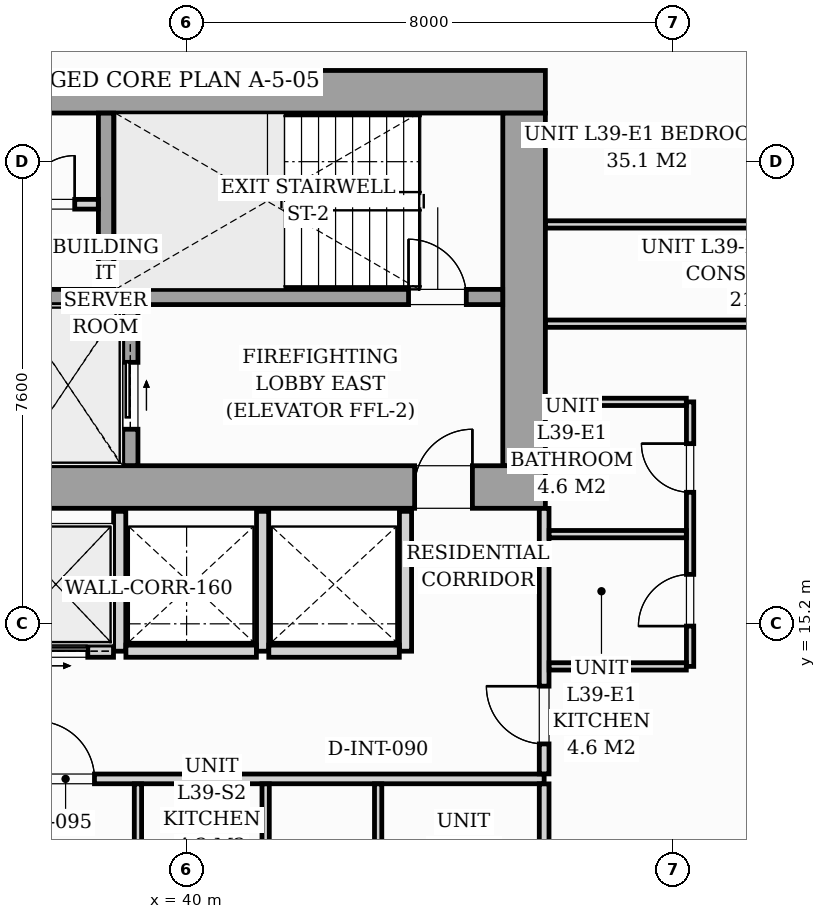
"""IFC4 building model, lengths in metres.
Left out: names, types, materials, properties, quantities, classifications, styles, units other than length and angle.
Written with IfcOpenShell. Run it as: python <this file> out.ifc"""

import sys

from ifc_helpers import new_model, si_unit, direction, frame, frame_2d, origin, origin_2d, place, context, subcontext, project, spatial, rectangle, i_section, extrude, source, transform, mapped, element, fill, save


model = new_model("IFC4")
c1 = context("Model", 3, precision=1e-05, world=origin(), true_north=direction((0.0, 1.0)))
c2 = subcontext(c1, "Body", "Model", "MODEL_VIEW")
j1 = project(units=[si_unit("LENGTHUNIT", "METRE"), si_unit("PLANEANGLEUNIT", "RADIAN")], contexts=[c1])
p1 = place(None, origin())
s1 = spatial("IfcSite", under=j1, at=p1, CompositionType="ELEMENT")
p2 = place(p1, origin())
s2 = spatial("IfcBuilding", under=s1, at=p2, CompositionType="ELEMENT")
p3 = place(p2, frame((0.0, 0.0, 137.4)))
s3 = spatial("IfcBuildingStorey", under=s2, at=p3, CompositionType="ELEMENT", Elevation=137.4)
m1 = source(origin(), c2, "Body", "SweptSolid", [
    extrude(i_section(OverallWidth=0.421, OverallDepth=0.465, WebThickness=0.045, FlangeThickness=0.073, FilletRadius=0.018, at=origin_2d()), origin(), (0.0, 0.0, 1.0), 3.196),
])
for number, where, z_axis, x_axis in (
    (1, (38.88, 17.4, 0.002), (0.0, 0.0, 1.0), (1.0, 0.0, 0.0)),
    (2, (45.6, 17.4, 0.002), (0.0, 0.0, 1.0), (1.0, 0.0, 0.0)),
    (3, (38.88, 24.0, 0.002), (0.0, 0.0, 1.0), (1.0, 0.0, 0.0)),
    (4, (45.6, 24.0, 0.002), (0.0, 0.0, 1.0), (1.0, 0.0, 0.0)),
):
    element("IfcColumn", number, at=place(p3, frame(where, z_axis=z_axis, x_axis=x_axis)), inside=s3, PredefinedType="PILASTER", context=c2, shape_type="MappedRepresentation", body=[
        mapped(m1, transform((0.0, 0.0, 0.0), scale=1.0)),
    ])
p4 = place(p3, frame((40.983, 25.727, 0.0), z_axis=(0.0, 0.0, 1.0), x_axis=(0.995395844771, -0.095849424686, 0.0)))
e5 = element("IfcWall", 5, at=p4, inside=s3, PredefinedType="STANDARD", context=c2, shape_type="SweptSolid", body=[
    extrude(rectangle(XDim=17.01, YDim=0.26, at=frame_2d((8.505, 0.0))), origin(), (0.0, 0.0, 1.0), 2.94),
])
p5 = place(p4, frame((8.79, 0.0, 0.0)))
e6 = element("IfcOpeningElement", 6, at=p5, cuts=e5, PredefinedType="OPENING", context=c2, shape_type="SweptSolid", body=[
    extrude(rectangle(XDim=1.8, YDim=2.06, at=frame_2d((0.9, 1.03))), frame((0.0, 0.14, 0.0), z_axis=(0.0, -1.0, 0.0), x_axis=(1.0, 0.0, 0.0)), (0.0, 0.0, 1.0), 0.28),
])
p6 = place(p4, frame((0.7, 0.0, 0.65)))
e7 = element("IfcOpeningElement", 7, at=p6, cuts=e5, PredefinedType="OPENING", context=c2, shape_type="SweptSolid", body=[
    extrude(rectangle(XDim=1.6, YDim=1.5, at=frame_2d((0.8, 0.75))), frame((0.0, 0.14, 0.0), z_axis=(0.0, -1.0, 0.0), x_axis=(1.0, 0.0, 0.0)), (0.0, 0.0, 1.0), 0.28),
])
p7 = place(p3, frame((26.1, 17.45, 0.0), z_axis=(0.0, 0.0, 1.0), x_axis=(1.0, 0.0, 0.0)))
e8 = element("IfcWall", 8, at=p7, inside=s3, PredefinedType="SHEAR", context=c2, shape_type="SweptSolid", body=[
    extrude(rectangle(XDim=19.8, YDim=0.7, at=frame_2d((9.9, 0.0))), origin(), (0.0, 0.0, 1.0), 3.2),
])
p8 = place(p7, frame((1.05, 0.0, 0.0)))
e9 = element("IfcOpeningElement", 9, at=p8, cuts=e8, PredefinedType="OPENING", context=c2, shape_type="SweptSolid", body=[
    extrude(rectangle(XDim=0.95, YDim=2.06, at=frame_2d((0.475, 1.03))), frame((0.0, 0.36, 0.0), z_axis=(0.0, -1.0, 0.0), x_axis=(1.0, 0.0, 0.0)), (0.0, 0.0, 1.0), 0.72),
])
p9 = place(p7, frame((9.48, 0.0, 0.0)))
e10 = element("IfcOpeningElement", 10, at=p9, cuts=e8, PredefinedType="OPENING", context=c2, shape_type="SweptSolid", body=[
    extrude(rectangle(XDim=0.85, YDim=2.0, at=frame_2d((0.425, 1.0))), frame((0.0, 0.36, 0.0), z_axis=(0.0, -1.0, 0.0), x_axis=(1.0, 0.0, 0.0)), (0.0, 0.0, 1.0), 0.72),
])
p10 = place(p7, frame((17.65, 0.0, 0.0)))
e11 = element("IfcOpeningElement", 11, at=p10, cuts=e8, PredefinedType="OPENING", context=c2, shape_type="SweptSolid", body=[
    extrude(rectangle(XDim=0.95, YDim=2.06, at=frame_2d((0.475, 1.03))), frame((0.0, 0.36, 0.0), z_axis=(0.0, -1.0, 0.0), x_axis=(1.0, 0.0, 0.0)), (0.0, 0.0, 1.0), 0.72),
])
p11 = place(p3, frame((26.1, 23.95, 0.0), z_axis=(0.0, 0.0, 1.0), x_axis=(1.0, 0.0, 0.0)))
e12 = element("IfcWall", 12, at=p11, inside=s3, PredefinedType="SHEAR", context=c2, shape_type="SweptSolid", body=[
    extrude(rectangle(XDim=19.8, YDim=0.7, at=frame_2d((9.9, 0.0))), origin(), (0.0, 0.0, 1.0), 3.2),
])
p12 = place(p3, frame((45.55, 17.802, 0.0), z_axis=(0.0, 0.0, 1.0), x_axis=(0.0, 1.0, 0.0)))
e13 = element("IfcWall", 13, at=p12, inside=s3, PredefinedType="SHEAR", context=c2, shape_type="SweptSolid", body=[
    extrude(rectangle(XDim=5.796, YDim=0.7, at=frame_2d((2.898, 0.0))), origin(), (0.0, 0.0, 1.0), 3.2),
])
p13 = place(p3, frame((37.05, 20.575, 0.0), z_axis=(0.0, 0.0, 1.0), x_axis=(1.0, 0.0, 0.0)))
e14 = element("IfcWall", 14, at=p13, inside=s3, PredefinedType="SOLIDWALL", context=c2, shape_type="SweptSolid", body=[
    extrude(rectangle(XDim=8.148, YDim=0.25, at=frame_2d((4.074, 0.0))), origin(), (0.0, 0.0, 1.0), 3.2),
])
p14 = place(p13, frame((6.6, 0.0, 0.0)))
e15 = element("IfcOpeningElement", 15, at=p14, cuts=e14, PredefinedType="OPENING", context=c2, shape_type="SweptSolid", body=[
    extrude(rectangle(XDim=0.95, YDim=2.06, at=frame_2d((0.475, 1.03))), frame((0.0, 0.135, 0.0), z_axis=(0.0, -1.0, 0.0), x_axis=(1.0, 0.0, 0.0)), (0.0, 0.0, 1.0), 0.27),
])
p15 = place(p3, frame((38.675, 20.702, 0.0), z_axis=(0.0, 0.0, 1.0), x_axis=(0.0, 1.0, 0.0)))
e16 = element("IfcWall", 16, at=p15, inside=s3, PredefinedType="SOLIDWALL", context=c2, shape_type="SweptSolid", body=[
    extrude(rectangle(XDim=2.896, YDim=0.25, at=frame_2d((1.448, 0.0))), origin(), (0.0, 0.0, 1.0), 3.2),
])
p16 = place(p3, frame((39.075, 17.802, 0.0), z_axis=(0.0, 0.0, 1.0), x_axis=(0.0, 1.0, 0.0)))
e17 = element("IfcWall", 17, at=p16, inside=s3, PredefinedType="SOLIDWALL", context=c2, shape_type="SweptSolid", body=[
    extrude(rectangle(XDim=2.646, YDim=0.25, at=frame_2d((1.323, 0.0))), origin(), (0.0, 0.0, 1.0), 3.2),
])
p17 = place(p16, frame((0.598, 0.0, 0.0)))
e18 = element("IfcOpeningElement", 18, at=p17, cuts=e17, PredefinedType="OPENING", context=c2, shape_type="SweptSolid", body=[
    extrude(rectangle(XDim=1.1, YDim=2.08, at=frame_2d((0.55, 1.04))), frame((0.0, 0.135, 0.0), z_axis=(0.0, -1.0, 0.0), x_axis=(1.0, 0.0, 0.0)), (0.0, 0.0, 1.0), 0.27),
])
p18 = place(p3, frame((33.452, 22.1, 0.0), z_axis=(0.0, 0.0, 1.0), x_axis=(1.0, 0.0, 0.0)))
e19 = element("IfcWall", 19, at=p18, inside=s3, PredefinedType="PARTITIONING", context=c2, shape_type="SweptSolid", body=[
    extrude(rectangle(XDim=5.096, YDim=0.16, at=frame_2d((2.548, 0.0))), origin(), (0.0, 0.0, 1.0), 2.94),
])
p19 = place(p18, frame((0.388, 0.0, 0.0)))
e20 = element("IfcOpeningElement", 20, at=p19, cuts=e19, PredefinedType="OPENING", context=c2, shape_type="SweptSolid", body=[
    extrude(rectangle(XDim=0.8, YDim=2.05, at=frame_2d((0.4, 1.025))), frame((0.0, 0.09, 0.0), z_axis=(0.0, -1.0, 0.0), x_axis=(1.0, 0.0, 0.0)), (0.0, 0.0, 1.0), 0.18),
])
p20 = place(p18, frame((2.148, 0.0, 0.0)))
e21 = element("IfcOpeningElement", 21, at=p20, cuts=e19, PredefinedType="OPENING", context=c2, shape_type="SweptSolid", body=[
    extrude(rectangle(XDim=0.8, YDim=2.05, at=frame_2d((0.4, 1.025))), frame((0.0, 0.09, 0.0), z_axis=(0.0, -1.0, 0.0), x_axis=(1.0, 0.0, 0.0)), (0.0, 0.0, 1.0), 0.18),
])
p21 = place(p18, frame((3.908, 0.0, 0.0)))
e22 = element("IfcOpeningElement", 22, at=p21, cuts=e19, PredefinedType="OPENING", context=c2, shape_type="SweptSolid", body=[
    extrude(rectangle(XDim=0.8, YDim=2.05, at=frame_2d((0.4, 1.025))), frame((0.0, 0.09, 0.0), z_axis=(0.0, -1.0, 0.0), x_axis=(1.0, 0.0, 0.0)), (0.0, 0.0, 1.0), 0.18),
])
p22 = place(p3, frame((38.9, 14.75, 0.0), z_axis=(0.0, 0.0, 1.0), x_axis=(0.0, 1.0, 0.0)))
e23 = element("IfcWall", 23, at=p22, inside=s3, PredefinedType="PARTITIONING", context=c2, shape_type="SweptSolid", body=[
    extrude(rectangle(XDim=2.3, YDim=0.2, at=frame_2d((1.15, 0.0))), origin(), (0.0, 0.0, 1.0), 2.94),
])
p23 = place(p3, frame((36.902, 14.75, 0.0), z_axis=(0.0, 0.0, 1.0), x_axis=(1.0, 0.0, 0.0)))
e24 = element("IfcWall", 24, at=p23, inside=s3, PredefinedType="PARTITIONING", context=c2, shape_type="SweptSolid", body=[
    extrude(rectangle(XDim=1.896, YDim=0.2, at=frame_2d((0.948, 0.0))), origin(), (0.0, 0.0, 1.0), 2.94),
])
p24 = place(p23, frame((0.423, 0.0, 0.0)))
e25 = element("IfcOpeningElement", 25, at=p24, cuts=e24, PredefinedType="OPENING", context=c2, shape_type="SweptSolid", body=[
    extrude(rectangle(XDim=1.05, YDim=2.08, at=frame_2d((0.525, 1.04))), frame((0.0, 0.11, 0.0), z_axis=(0.0, -1.0, 0.0), x_axis=(1.0, 0.0, 0.0)), (0.0, 0.0, 1.0), 0.22),
])
for number, where, z_axis, x_axis in (
    (26, (41.25, 14.75, 0.0), (0.0, 0.0, 1.0), (0.0, 1.0, 0.0)),
    (27, (43.6, 14.75, 0.0), (0.0, 0.0, 1.0), (0.0, 1.0, 0.0)),
):
    element("IfcWall", number, at=place(p3, frame(where, z_axis=z_axis, x_axis=x_axis)), inside=s3, PredefinedType="PARTITIONING", context=c2, shape_type="SweptSolid", body=[
        extrude(rectangle(XDim=2.3, YDim=0.2, at=frame_2d((1.15, 0.0))), origin(), (0.0, 0.0, 1.0), 2.94),
    ])
for number, where, z_axis, x_axis in (
    (28, (39.002, 14.75, 0.0), (0.0, 0.0, 1.0), (1.0, 0.0, 0.0)),
    (29, (41.352, 14.75, 0.0), (0.0, 0.0, 1.0), (1.0, 0.0, 0.0)),
):
    element("IfcWall", number, at=place(p3, frame(where, z_axis=z_axis, x_axis=x_axis)), inside=s3, PredefinedType="PARTITIONING", context=c2, shape_type="SweptSolid", body=[
        extrude(rectangle(XDim=2.146, YDim=0.2, at=frame_2d((1.073, 0.0))), origin(), (0.0, 0.0, 1.0), 2.94),
    ])
p25 = place(p3, frame((22.05, 12.65, 0.0), z_axis=(0.0, 0.0, 1.0), x_axis=(1.0, 0.0, 0.0)))
e30 = element("IfcWall", 30, at=p25, inside=s3, PredefinedType="PARTITIONING", context=c2, shape_type="SweptSolid", body=[
    extrude(rectangle(XDim=23.83, YDim=0.16, at=frame_2d((11.915, 0.0))), origin(), (0.0, 0.0, 1.0), 2.94),
])
p26 = place(p25, frame((3.0, 0.0, 0.0)))
e31 = element("IfcOpeningElement", 31, at=p26, cuts=e30, PredefinedType="OPENING", context=c2, shape_type="SweptSolid", body=[
    extrude(rectangle(XDim=0.95, YDim=2.06, at=frame_2d((0.475, 1.03))), frame((0.0, 0.09, 0.0), z_axis=(0.0, -1.0, 0.0), x_axis=(1.0, 0.0, 0.0)), (0.0, 0.0, 1.0), 0.18),
])
p27 = place(p25, frame((15.485, 0.0, 0.0)))
e32 = element("IfcOpeningElement", 32, at=p27, cuts=e30, PredefinedType="OPENING", context=c2, shape_type="SweptSolid", body=[
    extrude(rectangle(XDim=0.95, YDim=2.06, at=frame_2d((0.475, 1.03))), frame((0.0, 0.09, 0.0), z_axis=(0.0, -1.0, 0.0), x_axis=(1.0, 0.0, 0.0)), (0.0, 0.0, 1.0), 0.18),
])
p28 = place(p3, frame((45.88, 5.958, 0.0), z_axis=(0.0, 0.0, 1.0), x_axis=(0.0, 1.0, 0.0)))
e33 = element("IfcWall", 33, at=p28, inside=s3, PredefinedType="PARTITIONING", context=c2, shape_type="SweptSolid", body=[
    extrude(rectangle(XDim=6.61, YDim=0.16, at=frame_2d((3.305, 0.0))), origin(), (0.0, 0.0, 1.0), 2.94),
])
p29 = place(p3, frame((45.88, 12.732, 0.0), z_axis=(0.0, 0.0, 1.0), x_axis=(0.0, 1.0, 0.0)))
e34 = element("IfcWall", 34, at=p29, inside=s3, PredefinedType="PARTITIONING", context=c2, shape_type="SweptSolid", body=[
    extrude(rectangle(XDim=4.366, YDim=0.16, at=frame_2d((2.183, 0.0))), origin(), (0.0, 0.0, 1.0), 2.94),
])
p30 = place(p29, frame((0.493, 0.0, 0.0)))
e35 = element("IfcOpeningElement", 35, at=p30, cuts=e34, PredefinedType="OPENING", context=c2, shape_type="SweptSolid", body=[
    extrude(rectangle(XDim=0.95, YDim=2.06, at=frame_2d((0.475, 1.03))), frame((0.0, 0.09, 0.0), z_axis=(0.0, -1.0, 0.0), x_axis=(1.0, 0.0, 0.0)), (0.0, 0.0, 1.0), 0.18),
])
p31 = place(p3, frame((43.15, 6.221, 0.0), z_axis=(0.0, 0.0, 1.0), x_axis=(0.0, 1.0, 0.0)))
e36 = element("IfcWall", 36, at=p31, inside=s3, PredefinedType="PARTITIONING", context=c2, shape_type="SweptSolid", body=[
    extrude(rectangle(XDim=6.347, YDim=0.12, at=frame_2d((3.173, 0.0))), origin(), (0.0, 0.0, 1.0), 2.94),
])
p32 = place(p31, frame((3.079, 0.0, 0.0)))
e37 = element("IfcOpeningElement", 37, at=p32, cuts=e36, PredefinedType="OPENING", context=c2, shape_type="SweptSolid", body=[
    extrude(rectangle(XDim=0.9, YDim=2.05, at=frame_2d((0.45, 1.025))), frame((0.0, 0.07, 0.0), z_axis=(0.0, -1.0, 0.0), x_axis=(1.0, 0.0, 0.0)), (0.0, 0.0, 1.0), 0.14),
])
for number, where, z_axis, x_axis in (
    (38, (41.3, 10.462, 0.0), (0.0, 0.0, 1.0), (0.0, 1.0, 0.0)),
    (39, (39.2, 10.462, 0.0), (0.0, 0.0, 1.0), (0.0, 1.0, 0.0)),
):
    element("IfcWall", number, at=place(p3, frame(where, z_axis=z_axis, x_axis=x_axis)), inside=s3, PredefinedType="PARTITIONING", context=c2, shape_type="SweptSolid", body=[
        extrude(rectangle(XDim=2.106, YDim=0.12, at=frame_2d((1.053, 0.0))), origin(), (0.0, 0.0, 1.0), 2.94),
    ])
p33 = place(p3, frame((48.28, 14.5, 0.0), z_axis=(0.0, 0.0, 1.0), x_axis=(0.0, 1.0, 0.0)))
e40 = element("IfcWall", 40, at=p33, inside=s3, PredefinedType="PARTITIONING", context=c2, shape_type="SweptSolid", body=[
    extrude(rectangle(XDim=4.35, YDim=0.12, at=frame_2d((2.175, 0.0))), origin(), (0.0, 0.0, 1.0), 2.94),
])
p34 = place(p33, frame((0.663, 0.0, 0.0)))
e41 = element("IfcOpeningElement", 41, at=p34, cuts=e40, PredefinedType="OPENING", context=c2, shape_type="SweptSolid", body=[
    extrude(rectangle(XDim=0.85, YDim=2.05, at=frame_2d((0.425, 1.025))), frame((0.0, 0.07, 0.0), z_axis=(0.0, -1.0, 0.0), x_axis=(1.0, 0.0, 0.0)), (0.0, 0.0, 1.0), 0.14),
])
p35 = place(p33, frame((2.863, 0.0, 0.0)))
e42 = element("IfcOpeningElement", 42, at=p35, cuts=e40, PredefinedType="OPENING", context=c2, shape_type="SweptSolid", body=[
    extrude(rectangle(XDim=0.8, YDim=2.02, at=frame_2d((0.4, 1.01))), frame((0.0, 0.07, 0.0), z_axis=(0.0, -1.0, 0.0), x_axis=(1.0, 0.0, 0.0)), (0.0, 0.0, 1.0), 0.14),
])
p36 = place(p3, frame((45.962, 16.675, 0.0), z_axis=(0.0, 0.0, 1.0), x_axis=(1.0, 0.0, 0.0)))
e43 = element("IfcWall", 43, at=p36, inside=s3, PredefinedType="PARTITIONING", context=c2, shape_type="SweptSolid", body=[
    extrude(rectangle(XDim=2.256, YDim=0.12, at=frame_2d((1.128, 0.0))), origin(), (0.0, 0.0, 1.0), 2.063),
])
p37 = place(p3, frame((45.962, 14.5, 0.0), z_axis=(0.0, 0.0, 1.0), x_axis=(1.0, 0.0, 0.0)))
e44 = element("IfcWall", 44, at=p37, inside=s3, PredefinedType="PARTITIONING", context=c2, shape_type="SweptSolid", body=[
    extrude(rectangle(XDim=2.256, YDim=0.12, at=frame_2d((1.128, 0.0))), origin(), (0.0, 0.0, 1.0), 2.94),
])
p38 = place(p3, frame((45.902, 18.85, 0.0), z_axis=(0.0, 0.0, 1.0), x_axis=(1.0, 0.0, 0.0)))
e45 = element("IfcWall", 45, at=p38, inside=s3, PredefinedType="PARTITIONING", context=c2, shape_type="SweptSolid", body=[
    extrude(rectangle(XDim=2.316, YDim=0.12, at=frame_2d((1.158, 0.0))), origin(), (0.0, 0.0, 1.0), 2.94),
])
p39 = place(p3, frame((45.902, 21.768, 0.0), z_axis=(0.0, 0.0, 1.0), x_axis=(1.0, 0.0, 0.0)))
e46 = element("IfcWall", 46, at=p39, inside=s3, PredefinedType="PARTITIONING", context=c2, shape_type="SweptSolid", body=[
    extrude(rectangle(XDim=12.781, YDim=0.12, at=frame_2d((6.391, 0.0))), origin(), (0.0, 0.0, 1.0), 2.94),
])
p40 = place(p39, frame((6.146, 0.0, 0.0)))
e47 = element("IfcOpeningElement", 47, at=p40, cuts=e46, PredefinedType="OPENING", context=c2, shape_type="SweptSolid", body=[
    extrude(rectangle(XDim=0.85, YDim=2.05, at=frame_2d((0.425, 1.025))), frame((0.0, 0.07, 0.0), z_axis=(0.0, -1.0, 0.0), x_axis=(1.0, 0.0, 0.0)), (0.0, 0.0, 1.0), 0.14),
])
p41 = place(p3, frame((45.902, 20.136, 0.0), z_axis=(0.0, 0.0, 1.0), x_axis=(1.0, 0.0, 0.0)))
e48 = element("IfcWall", 48, at=p41, inside=s3, PredefinedType="PARTITIONING", context=c2, shape_type="SweptSolid", body=[
    extrude(rectangle(XDim=14.063, YDim=0.12, at=frame_2d((7.031, 0.0))), origin(), (0.0, 0.0, 1.0), 2.94),
])
p42 = place(p41, frame((6.708, 0.0, 0.0)))
e49 = element("IfcOpeningElement", 49, at=p42, cuts=e48, PredefinedType="OPENING", context=c2, shape_type="SweptSolid", body=[
    extrude(rectangle(XDim=0.85, YDim=2.05, at=frame_2d((0.425, 1.025))), frame((0.0, 0.07, 0.0), z_axis=(0.0, -1.0, 0.0), x_axis=(1.0, 0.0, 0.0)), (0.0, 0.0, 1.0), 0.14),
])
m2 = source(origin(), c2, "Body", "SweptSolid", [
    extrude(rectangle(XDim=0.95, YDim=2.06, at=frame_2d((0.475, 1.03))), frame((0.0, 0.025, 0.0), z_axis=(0.0, -1.0, 0.0), x_axis=(1.0, 0.0, 0.0)), (0.0, 0.0, 1.0), 0.05),
])
p43 = place(p10, origin())
e50 = element("IfcDoor", 50, at=p43, inside=s3, OperationType="SINGLE_SWING_RIGHT", PredefinedType="DOOR", context=c2, shape_type="MappedRepresentation", body=[
    mapped(m2, transform((0.0, 0.0, 0.0), scale=1.0)),
])
fill(e11, e50)
p44 = place(p14, origin())
e51 = element("IfcDoor", 51, at=p44, inside=s3, OperationType="SINGLE_SWING_LEFT", PredefinedType="DOOR", context=c2, shape_type="MappedRepresentation", body=[
    mapped(m2, transform((0.0, 0.0, 0.0), scale=1.0)),
])
fill(e15, e51)
m3 = source(origin(), c2, "Body", "SweptSolid", [
    extrude(rectangle(XDim=1.1, YDim=2.08, at=frame_2d((0.55, 1.04))), frame((0.0, 0.025, 0.0), z_axis=(0.0, -1.0, 0.0), x_axis=(1.0, 0.0, 0.0)), (0.0, 0.0, 1.0), 0.05),
])
p45 = place(p17, origin())
e52 = element("IfcDoor", 52, at=p45, inside=s3, OperationType="SLIDING_TO_RIGHT", PredefinedType="DOOR", context=c2, shape_type="MappedRepresentation", body=[
    mapped(m3, transform((0.0, 0.0, 0.0), scale=1.0)),
])
fill(e18, e52)
m4 = source(origin(), c2, "Body", "SweptSolid", [
    extrude(rectangle(XDim=0.8, YDim=2.05, at=frame_2d((0.4, 1.025))), frame((0.0, 0.025, 0.0), z_axis=(0.0, -1.0, 0.0), x_axis=(1.0, 0.0, 0.0)), (0.0, 0.0, 1.0), 0.05),
])
p46 = place(p21, origin())
e53 = element("IfcDoor", 53, at=p46, inside=s3, OperationType="SINGLE_SWING_RIGHT", PredefinedType="DOOR", context=c2, shape_type="MappedRepresentation", body=[
    mapped(m4, transform((0.0, 0.0, 0.0), scale=1.0)),
])
fill(e22, e53)
m5 = source(origin(), c2, "Body", "SweptSolid", [
    extrude(rectangle(XDim=1.05, YDim=2.08, at=frame_2d((0.525, 1.04))), frame((0.0, 0.025, 0.0), z_axis=(0.0, -1.0, 0.0), x_axis=(1.0, 0.0, 0.0)), (0.0, 0.0, 1.0), 0.05),
])
p47 = place(p24, origin())
e54 = element("IfcDoor", 54, at=p47, inside=s3, OperationType="SLIDING_TO_RIGHT", PredefinedType="DOOR", context=c2, shape_type="MappedRepresentation", body=[
    mapped(m5, transform((0.0, 0.0, 0.0), scale=1.0)),
])
fill(e25, e54)
m6 = source(origin(), c2, "Body", "SweptSolid", [
    extrude(rectangle(XDim=0.95, YDim=2.06, at=frame_2d((0.475, 1.03))), frame((0.0, 0.025, 0.0), z_axis=(0.0, -1.0, 0.0), x_axis=(1.0, 0.0, 0.0)), (0.0, 0.0, 1.0), 0.05),
])
p48 = place(p27, origin())
e55 = element("IfcDoor", 55, at=p48, inside=s3, OperationType="SINGLE_SWING_LEFT", PredefinedType="DOOR", context=c2, shape_type="MappedRepresentation", body=[
    mapped(m6, transform((0.0, 0.0, 0.0), scale=1.0)),
])
fill(e32, e55)
p49 = place(p30, origin())
e56 = element("IfcDoor", 56, at=p49, inside=s3, OperationType="SINGLE_SWING_RIGHT", PredefinedType="DOOR", context=c2, shape_type="MappedRepresentation", body=[
    mapped(m6, transform((0.0, 0.0, 0.0), scale=1.0)),
])
fill(e35, e56)
m7 = source(origin(), c2, "Body", "SweptSolid", [
    extrude(rectangle(XDim=0.85, YDim=2.05, at=frame_2d((0.425, 1.025))), frame((0.0, 0.025, 0.0), z_axis=(0.0, -1.0, 0.0), x_axis=(1.0, 0.0, 0.0)), (0.0, 0.0, 1.0), 0.05),
])
p50 = place(p34, origin())
e57 = element("IfcDoor", 57, at=p50, inside=s3, OperationType="SINGLE_SWING_LEFT", PredefinedType="DOOR", context=c2, shape_type="MappedRepresentation", body=[
    mapped(m7, transform((0.0, 0.0, 0.0), scale=1.0)),
])
fill(e41, e57)
m8 = source(origin(), c2, "Body", "SweptSolid", [
    extrude(rectangle(XDim=0.8, YDim=2.02, at=frame_2d((0.4, 1.01))), frame((0.0, 0.025, 0.0), z_axis=(0.0, -1.0, 0.0), x_axis=(1.0, 0.0, 0.0)), (0.0, 0.0, 1.0), 0.05),
])
p51 = place(p35, origin())
e58 = element("IfcDoor", 58, at=p51, inside=s3, OperationType="SINGLE_SWING_RIGHT", PredefinedType="DOOR", context=c2, shape_type="MappedRepresentation", body=[
    mapped(m8, transform((0.0, 0.0, 0.0), scale=1.0)),
])
fill(e42, e58)
save(model, sys.argv[1])
